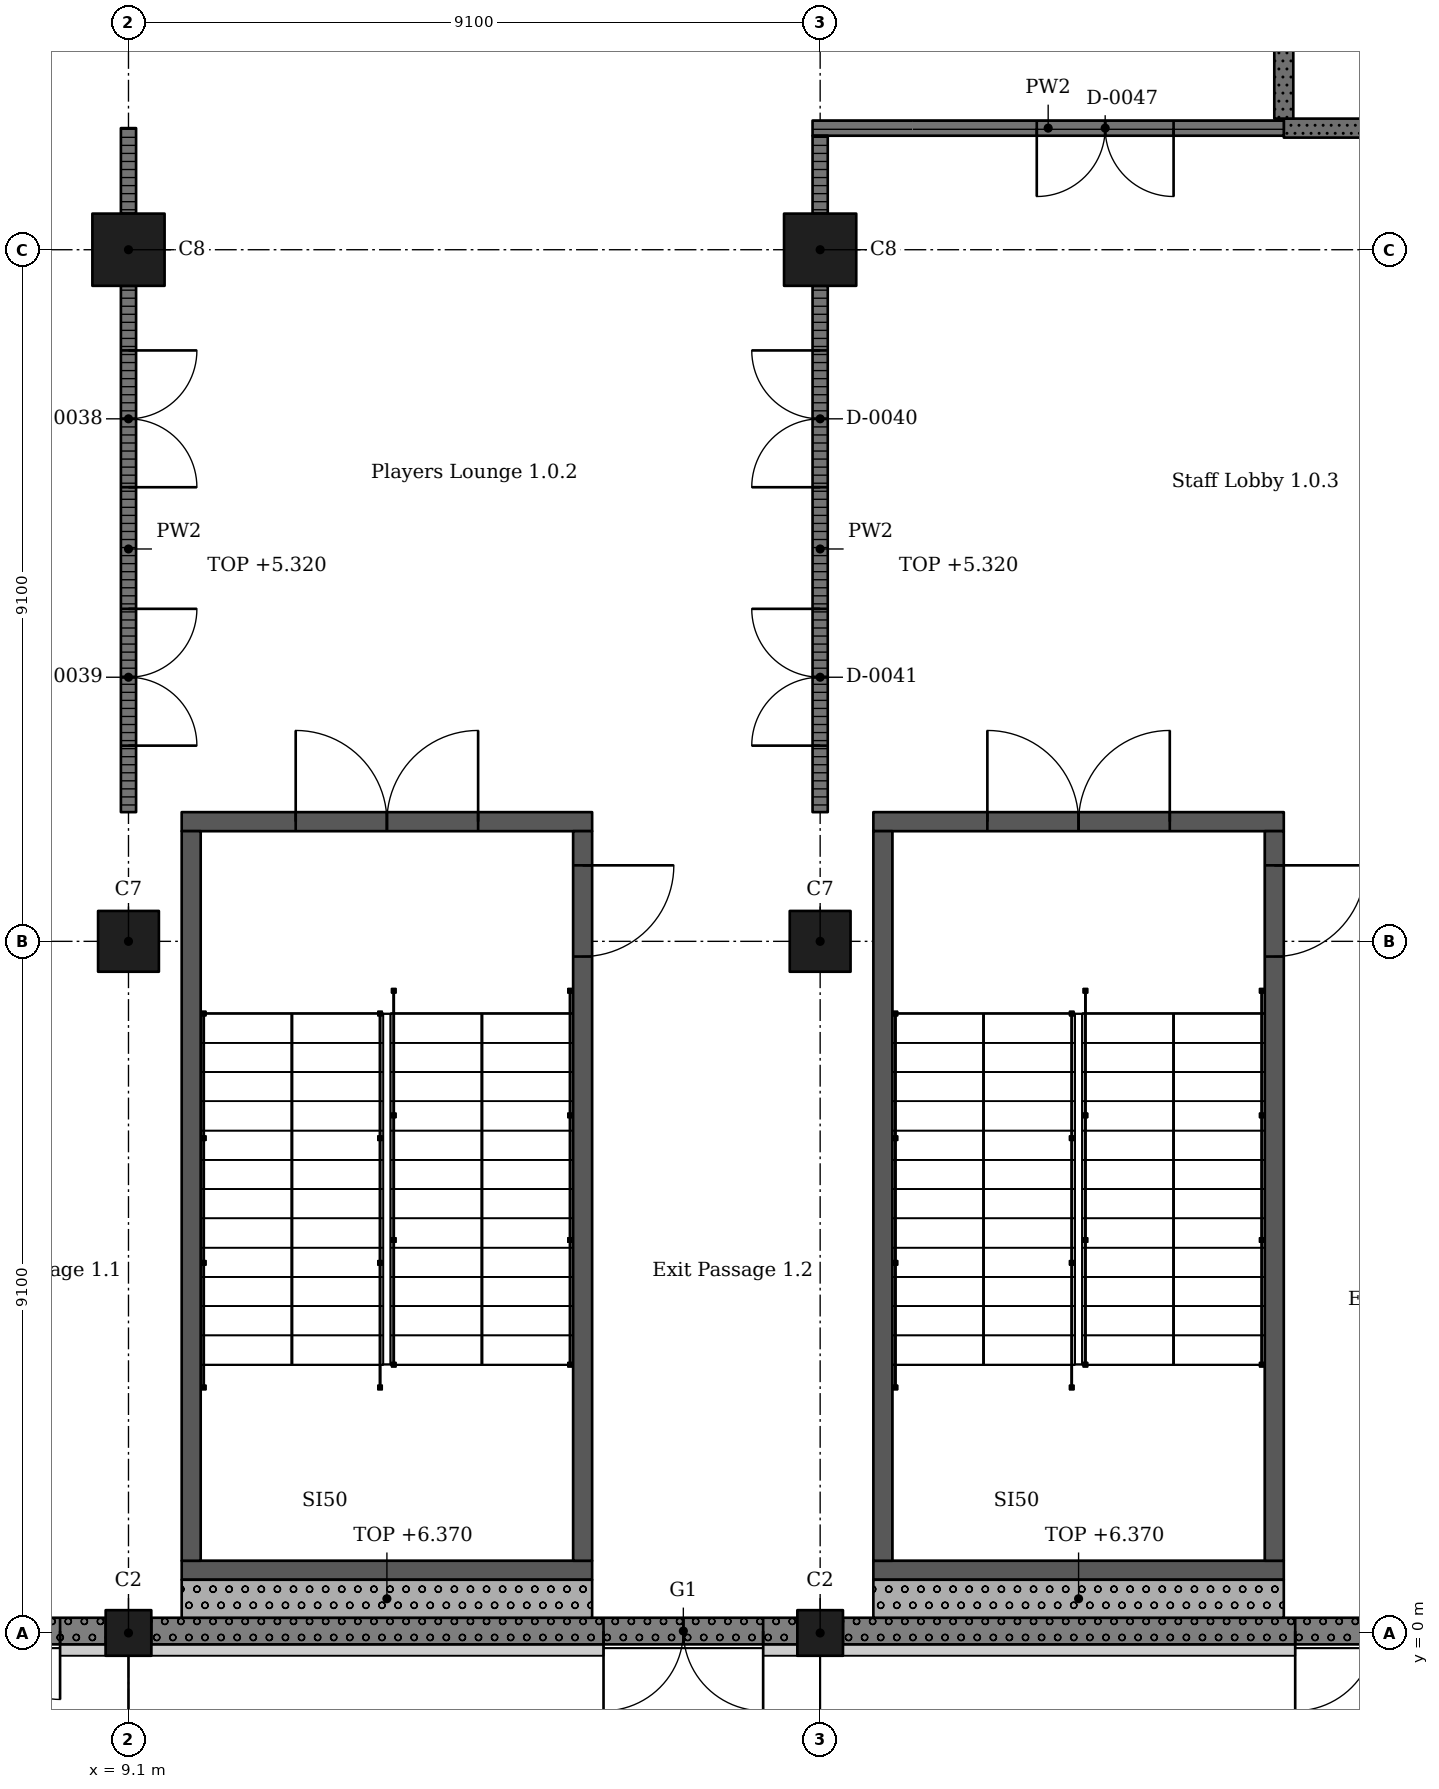
"""IFC4 building model, lengths in metres.
Left out: names, types, materials, properties, quantities, classifications, styles, units other than length and angle.
Written with IfcOpenShell. Run it as: python <this file> out.ifc"""

import sys

from ifc_helpers import new_model, si_unit, direction, frame, frame_2d, origin, origin_2d, place, context, subcontext, project, spatial, rectangle, extrude, element, fill, save


model = new_model("IFC4")
c1 = context("Model", 3, precision=1e-05, world=origin(), true_north=direction((0.0, 1.0)))
c2 = subcontext(c1, "Body", "Model", "MODEL_VIEW")
j1 = project(units=[si_unit("LENGTHUNIT", "METRE"), si_unit("PLANEANGLEUNIT", "RADIAN")], contexts=[c1])
p1 = place(None, origin())
s1 = spatial("IfcSite", under=j1, at=p1, CompositionType="ELEMENT")
p2 = place(p1, origin())
s2 = spatial("IfcBuilding", under=s1, at=p2, CompositionType="ELEMENT")
p3 = place(p2, origin())
s3 = spatial("IfcBuildingStorey", under=s2, at=p3, CompositionType="ELEMENT", Elevation=0.0)
p4 = place(p3, frame((9.1, 0.0, -0.4), z_axis=(0.0, 0.0, 1.0), x_axis=(1.0, 0.0, 0.0)))
e1 = element("IfcColumn", 1, at=p4, inside=s3, PredefinedType="COLUMN", context=c2, shape_type="SweptSolid", body=[
    extrude(rectangle(XDim=0.6, YDim=0.6, at=origin_2d()), origin(), (0.0, 0.0, 1.0), 6.77),
])
p5 = place(p3, frame((9.1, 9.1, -0.4), z_axis=(0.0, 0.0, 1.0), x_axis=(1.0, 0.0, 0.0)))
e2 = element("IfcColumn", 2, at=p5, inside=s3, PredefinedType="COLUMN", context=c2, shape_type="SweptSolid", body=[
    extrude(rectangle(XDim=0.8, YDim=0.8, at=origin_2d()), origin(), (0.0, 0.0, 1.0), 6.77),
])
p6 = place(p3, frame((9.1, 18.2, -0.4), z_axis=(0.0, 0.0, 1.0), x_axis=(1.0, 0.0, 0.0)))
e3 = element("IfcColumn", 3, at=p6, inside=s3, PredefinedType="COLUMN", context=c2, shape_type="SweptSolid", body=[
    extrude(rectangle(XDim=0.95, YDim=0.95, at=origin_2d()), origin(), (0.0, 0.0, 1.0), 6.77),
])
p7 = place(p3, frame((18.2, 0.0, -0.4), z_axis=(0.0, 0.0, 1.0), x_axis=(1.0, 0.0, 0.0)))
e4 = element("IfcColumn", 4, at=p7, inside=s3, PredefinedType="COLUMN", context=c2, shape_type="SweptSolid", body=[
    extrude(rectangle(XDim=0.6, YDim=0.6, at=origin_2d()), origin(), (0.0, 0.0, 1.0), 6.77),
])
p8 = place(p3, frame((18.2, 9.1, -0.4), z_axis=(0.0, 0.0, 1.0), x_axis=(1.0, 0.0, 0.0)))
e5 = element("IfcColumn", 5, at=p8, inside=s3, PredefinedType="COLUMN", context=c2, shape_type="SweptSolid", body=[
    extrude(rectangle(XDim=0.8, YDim=0.8, at=origin_2d()), origin(), (0.0, 0.0, 1.0), 6.77),
])
p9 = place(p3, frame((18.2, 18.2, -0.4), z_axis=(0.0, 0.0, 1.0), x_axis=(1.0, 0.0, 0.0)))
e6 = element("IfcColumn", 6, at=p9, inside=s3, PredefinedType="COLUMN", context=c2, shape_type="SweptSolid", body=[
    extrude(rectangle(XDim=0.95, YDim=0.95, at=origin_2d()), origin(), (0.0, 0.0, 1.0), 6.77),
])
p10 = place(p3, frame((15.2, 0.825, -0.4), z_axis=(0.0, 0.0, 1.0), x_axis=(-1.0, 0.0, 0.0)))
e7 = element("IfcWall", 7, at=p10, inside=s3, PredefinedType="SHEAR", context=c2, shape_type="SweptSolid", body=[
    extrude(rectangle(XDim=5.4, YDim=0.25, at=frame_2d((2.7, 0.0))), origin(), (0.0, 0.0, 1.0), 6.77),
])
p11 = place(p3, frame((15.2, 10.675, -0.4), z_axis=(0.0, 0.0, 1.0), x_axis=(-1.0, 0.0, 0.0)))
e8 = element("IfcWall", 8, at=p11, inside=s3, PredefinedType="SHEAR", context=c2, shape_type="SweptSolid", body=[
    extrude(rectangle(XDim=5.4, YDim=0.25, at=frame_2d((2.7, 0.0))), origin(), (0.0, 0.0, 1.0), 6.77),
])
p12 = place(p11, frame((1.5, 0.0, 0.4)))
e9 = element("IfcOpeningElement", 9, at=p12, cuts=e8, PredefinedType="OPENING", context=c2, shape_type="SweptSolid", body=[
    extrude(rectangle(XDim=2.4, YDim=2.1, at=frame_2d((1.2, 1.05))), frame((0.0, 0.135, 0.0), z_axis=(0.0, -1.0, 0.0), x_axis=(1.0, 0.0, 0.0)), (0.0, 0.0, 1.0), 0.27),
])
p13 = place(p3, frame((9.925, 10.55, -0.4), z_axis=(0.0, 0.0, 1.0), x_axis=(0.0, -1.0, 0.0)))
e10 = element("IfcWall", 10, at=p13, inside=s3, PredefinedType="SHEAR", context=c2, shape_type="SweptSolid", body=[
    extrude(rectangle(XDim=9.6, YDim=0.25, at=frame_2d((4.8, 0.0))), origin(), (0.0, 0.0, 1.0), 6.77),
])
p14 = place(p3, frame((15.075, 10.55, -0.4), z_axis=(0.0, 0.0, 1.0), x_axis=(0.0, -1.0, 0.0)))
e11 = element("IfcWall", 11, at=p14, inside=s3, PredefinedType="SHEAR", context=c2, shape_type="SweptSolid", body=[
    extrude(rectangle(XDim=9.6, YDim=0.25, at=frame_2d((4.8, 0.0))), origin(), (0.0, 0.0, 1.0), 6.77),
])
p15 = place(p14, frame((0.45, 0.0, 0.4)))
e12 = element("IfcOpeningElement", 12, at=p15, cuts=e11, PredefinedType="OPENING", context=c2, shape_type="SweptSolid", body=[
    extrude(rectangle(XDim=1.2, YDim=2.1, at=frame_2d((0.6, 1.05))), frame((0.0, 0.135, 0.0), z_axis=(0.0, -1.0, 0.0), x_axis=(1.0, 0.0, 0.0)), (0.0, 0.0, 1.0), 0.27),
])
p16 = place(p3, frame((24.3, 0.825, -0.4), z_axis=(0.0, 0.0, 1.0), x_axis=(-1.0, 0.0, 0.0)))
e13 = element("IfcWall", 13, at=p16, inside=s3, PredefinedType="SHEAR", context=c2, shape_type="SweptSolid", body=[
    extrude(rectangle(XDim=5.4, YDim=0.25, at=frame_2d((2.7, 0.0))), origin(), (0.0, 0.0, 1.0), 6.77),
])
p17 = place(p3, frame((24.3, 10.675, -0.4), z_axis=(0.0, 0.0, 1.0), x_axis=(-1.0, 0.0, 0.0)))
e14 = element("IfcWall", 14, at=p17, inside=s3, PredefinedType="SHEAR", context=c2, shape_type="SweptSolid", body=[
    extrude(rectangle(XDim=5.4, YDim=0.25, at=frame_2d((2.7, 0.0))), origin(), (0.0, 0.0, 1.0), 6.77),
])
p18 = place(p17, frame((1.5, 0.0, 0.4)))
e15 = element("IfcOpeningElement", 15, at=p18, cuts=e14, PredefinedType="OPENING", context=c2, shape_type="SweptSolid", body=[
    extrude(rectangle(XDim=2.4, YDim=2.1, at=frame_2d((1.2, 1.05))), frame((0.0, 0.135, 0.0), z_axis=(0.0, -1.0, 0.0), x_axis=(1.0, 0.0, 0.0)), (0.0, 0.0, 1.0), 0.27),
])
p19 = place(p3, frame((19.025, 10.55, -0.4), z_axis=(0.0, 0.0, 1.0), x_axis=(0.0, -1.0, 0.0)))
e16 = element("IfcWall", 16, at=p19, inside=s3, PredefinedType="SHEAR", context=c2, shape_type="SweptSolid", body=[
    extrude(rectangle(XDim=9.6, YDim=0.25, at=frame_2d((4.8, 0.0))), origin(), (0.0, 0.0, 1.0), 6.77),
])
p20 = place(p3, frame((24.175, 10.55, -0.4), z_axis=(0.0, 0.0, 1.0), x_axis=(0.0, -1.0, 0.0)))
e17 = element("IfcWall", 17, at=p20, inside=s3, PredefinedType="SHEAR", context=c2, shape_type="SweptSolid", body=[
    extrude(rectangle(XDim=9.6, YDim=0.25, at=frame_2d((4.8, 0.0))), origin(), (0.0, 0.0, 1.0), 6.77),
])
p21 = place(p20, frame((0.45, 0.0, 0.4)))
e18 = element("IfcOpeningElement", 18, at=p21, cuts=e17, PredefinedType="OPENING", context=c2, shape_type="SweptSolid", body=[
    extrude(rectangle(XDim=1.2, YDim=2.1, at=frame_2d((0.6, 1.05))), frame((0.0, 0.135, 0.0), z_axis=(0.0, -1.0, 0.0), x_axis=(1.0, 0.0, 0.0)), (0.0, 0.0, 1.0), 0.27),
])
p22 = place(p3, frame((0.25, 0.025, 0.0), z_axis=(0.0, 0.0, 1.0), x_axis=(1.0, 0.0, 0.0)))
e19 = element("IfcWall", 19, at=p22, inside=s3, PredefinedType="SOLIDWALL", context=c2, shape_type="SweptSolid", body=[
    extrude(rectangle(XDim=8.55, YDim=0.35, at=frame_2d((4.275, 0.0))), origin(), (0.0, 0.0, 1.0), 5.27),
])
p23 = place(p22, frame((6.15, 0.0, 0.0)))
e20 = element("IfcOpeningElement", 20, at=p23, cuts=e19, PredefinedType="OPENING", context=c2, shape_type="SweptSolid", body=[
    extrude(rectangle(XDim=1.8, YDim=2.4, at=frame_2d((0.9, 1.2))), frame((0.0, 0.185, 0.0), z_axis=(0.0, -1.0, 0.0), x_axis=(1.0, 0.0, 0.0)), (0.0, 0.0, 1.0), 0.37),
])
p24 = place(p3, frame((9.4, 0.025, 0.0), z_axis=(0.0, 0.0, 1.0), x_axis=(1.0, 0.0, 0.0)))
e21 = element("IfcWall", 21, at=p24, inside=s3, PredefinedType="SOLIDWALL", context=c2, shape_type="SweptSolid", body=[
    extrude(rectangle(XDim=8.5, YDim=0.35, at=frame_2d((4.25, 0.0))), origin(), (0.0, 0.0, 1.0), 5.27),
])
p25 = place(p24, frame((5.95, 0.0, 0.0)))
e22 = element("IfcOpeningElement", 22, at=p25, cuts=e21, PredefinedType="OPENING", context=c2, shape_type="SweptSolid", body=[
    extrude(rectangle(XDim=2.1, YDim=2.4, at=frame_2d((1.05, 1.2))), frame((0.0, 0.185, 0.0), z_axis=(0.0, -1.0, 0.0), x_axis=(1.0, 0.0, 0.0)), (0.0, 0.0, 1.0), 0.37),
])
p26 = place(p3, frame((18.5, 0.025, 0.0), z_axis=(0.0, 0.0, 1.0), x_axis=(1.0, 0.0, 0.0)))
e23 = element("IfcWall", 23, at=p26, inside=s3, PredefinedType="SOLIDWALL", context=c2, shape_type="SweptSolid", body=[
    extrude(rectangle(XDim=8.45, YDim=0.35, at=frame_2d((4.225, 0.0))), origin(), (0.0, 0.0, 1.0), 5.27),
])
p27 = place(p26, frame((5.95, 0.0, 0.0)))
e24 = element("IfcOpeningElement", 24, at=p27, cuts=e23, PredefinedType="OPENING", context=c2, shape_type="SweptSolid", body=[
    extrude(rectangle(XDim=2.1, YDim=2.4, at=frame_2d((1.05, 1.2))), frame((0.0, 0.185, 0.0), z_axis=(0.0, -1.0, 0.0), x_axis=(1.0, 0.0, 0.0)), (0.0, 0.0, 1.0), 0.37),
])
p28 = place(p3, frame((9.8, 0.45, 0.0), z_axis=(0.0, 0.0, 1.0), x_axis=(1.0, 0.0, 0.0)))
e25 = element("IfcWall", 25, at=p28, inside=s3, PredefinedType="SOLIDWALL", context=c2, shape_type="SweptSolid", body=[
    extrude(rectangle(XDim=5.4, YDim=0.5, at=frame_2d((2.7, 0.0))), origin(), (0.0, 0.0, 1.0), 6.37),
])
p29 = place(p3, frame((18.9, 0.45, 0.0), z_axis=(0.0, 0.0, 1.0), x_axis=(1.0, 0.0, 0.0)))
e26 = element("IfcWall", 26, at=p29, inside=s3, PredefinedType="SOLIDWALL", context=c2, shape_type="SweptSolid", body=[
    extrude(rectangle(XDim=5.4, YDim=0.5, at=frame_2d((2.7, 0.0))), origin(), (0.0, 0.0, 1.0), 6.37),
])
p30 = place(p3, frame((9.1, 17.725, 0.0), z_axis=(0.0, 0.0, 1.0), x_axis=(0.0, -1.0, 0.0)))
e27 = element("IfcWall", 27, at=p30, inside=s3, PredefinedType="PARTITIONING", context=c2, shape_type="SweptSolid", body=[
    extrude(rectangle(XDim=6.925, YDim=0.2, at=frame_2d((3.462, 0.0))), origin(), (0.0, 0.0, 1.0), 5.32),
])
p31 = place(p30, frame((0.85, 0.0, 0.0)))
e28 = element("IfcOpeningElement", 28, at=p31, cuts=e27, PredefinedType="OPENING", context=c2, shape_type="SweptSolid", body=[
    extrude(rectangle(XDim=1.8, YDim=2.4, at=frame_2d((0.9, 1.2))), frame((0.0, 0.11, 0.0), z_axis=(0.0, -1.0, 0.0), x_axis=(1.0, 0.0, 0.0)), (0.0, 0.0, 1.0), 0.22),
])
p32 = place(p30, frame((4.25, 0.0, 0.0)))
e29 = element("IfcOpeningElement", 29, at=p32, cuts=e27, PredefinedType="OPENING", context=c2, shape_type="SweptSolid", body=[
    extrude(rectangle(XDim=1.8, YDim=2.4, at=frame_2d((0.9, 1.2))), frame((0.0, 0.11, 0.0), z_axis=(0.0, -1.0, 0.0), x_axis=(1.0, 0.0, 0.0)), (0.0, 0.0, 1.0), 0.22),
])
p33 = place(p3, frame((9.1, 19.8, 0.0), z_axis=(0.0, 0.0, 1.0), x_axis=(0.0, -1.0, 0.0)))
e30 = element("IfcWall", 30, at=p33, inside=s3, PredefinedType="PARTITIONING", context=c2, shape_type="SweptSolid", body=[
    extrude(rectangle(XDim=1.125, YDim=0.2, at=frame_2d((0.562, 0.0))), origin(), (0.0, 0.0, 1.0), 5.32),
])
p34 = place(p3, frame((18.1, 19.8, 0.0), z_axis=(0.0, 0.0, 1.0), x_axis=(1.0, 0.0, 0.0)))
e31 = element("IfcWall", 31, at=p34, inside=s3, PredefinedType="PARTITIONING", context=c2, shape_type="SweptSolid", body=[
    extrude(rectangle(XDim=6.2, YDim=0.2, at=frame_2d((3.1, 0.0))), origin(), (0.0, 0.0, 1.0), 6.02),
])
p35 = place(p34, frame((2.95, 0.0, 0.0)))
e32 = element("IfcOpeningElement", 32, at=p35, cuts=e31, PredefinedType="OPENING", context=c2, shape_type="SweptSolid", body=[
    extrude(rectangle(XDim=1.8, YDim=2.4, at=frame_2d((0.9, 1.2))), frame((0.0, 0.11, 0.0), z_axis=(0.0, -1.0, 0.0), x_axis=(1.0, 0.0, 0.0)), (0.0, 0.0, 1.0), 0.22),
])
p36 = place(p3, frame((18.2, 17.725, 0.0), z_axis=(0.0, 0.0, 1.0), x_axis=(0.0, -1.0, 0.0)))
e33 = element("IfcWall", 33, at=p36, inside=s3, PredefinedType="PARTITIONING", context=c2, shape_type="SweptSolid", body=[
    extrude(rectangle(XDim=6.925, YDim=0.2, at=frame_2d((3.462, 0.0))), origin(), (0.0, 0.0, 1.0), 5.32),
])
p37 = place(p36, frame((0.85, 0.0, 0.0)))
e34 = element("IfcOpeningElement", 34, at=p37, cuts=e33, PredefinedType="OPENING", context=c2, shape_type="SweptSolid", body=[
    extrude(rectangle(XDim=1.8, YDim=2.4, at=frame_2d((0.9, 1.2))), frame((0.0, 0.11, 0.0), z_axis=(0.0, -1.0, 0.0), x_axis=(1.0, 0.0, 0.0)), (0.0, 0.0, 1.0), 0.22),
])
p38 = place(p36, frame((4.25, 0.0, 0.0)))
e35 = element("IfcOpeningElement", 35, at=p38, cuts=e33, PredefinedType="OPENING", context=c2, shape_type="SweptSolid", body=[
    extrude(rectangle(XDim=1.8, YDim=2.4, at=frame_2d((0.9, 1.2))), frame((0.0, 0.11, 0.0), z_axis=(0.0, -1.0, 0.0), x_axis=(1.0, 0.0, 0.0)), (0.0, 0.0, 1.0), 0.22),
])
p39 = place(p3, frame((18.2, 19.7, 0.0), z_axis=(0.0, 0.0, 1.0), x_axis=(0.0, -1.0, 0.0)))
e36 = element("IfcWall", 36, at=p39, inside=s3, PredefinedType="PARTITIONING", context=c2, shape_type="SweptSolid", body=[
    extrude(rectangle(XDim=1.025, YDim=0.2, at=frame_2d((0.512, 0.0))), origin(), (0.0, 0.0, 1.0), 5.32),
])
p40 = place(p3, frame((24.3, 19.8, 0.0), z_axis=(0.0, 0.0, 1.0), x_axis=(1.0, 0.0, 0.0)))
e37 = element("IfcWall", 37, at=p40, inside=s3, PredefinedType="SOLIDWALL", context=c2, shape_type="SweptSolid", body=[
    extrude(rectangle(XDim=2.65, YDim=0.25, at=frame_2d((1.325, 0.0))), origin(), (0.0, 0.0, 1.0), 6.02),
])
p41 = place(p3, frame((24.3, 22.8, 0.0), z_axis=(0.0, 0.0, 1.0), x_axis=(0.0, -1.0, 0.0)))
e38 = element("IfcWall", 38, at=p41, inside=s3, PredefinedType="SOLIDWALL", context=c2, shape_type="SweptSolid", body=[
    extrude(rectangle(XDim=2.875, YDim=0.25, at=frame_2d((1.438, 0.0))), origin(), (0.0, 0.0, 1.0), 6.02),
])
p42 = place(p23, frame((1.8, 0.0, 0.0), z_axis=(0.0, 0.0, 1.0), x_axis=(-1.0, 0.0, 0.0)))
e39 = element("IfcDoor", 39, at=p42, inside=s3, OperationType="DOUBLE_DOOR_SINGLE_SWING", PredefinedType="DOOR", context=c2, shape_type="SweptSolid", body=[
    extrude(rectangle(XDim=1.8, YDim=2.4, at=frame_2d((0.9, 1.2))), frame((0.0, 0.025, 0.0), z_axis=(0.0, -1.0, 0.0), x_axis=(1.0, 0.0, 0.0)), (0.0, 0.0, 1.0), 0.05),
])
fill(e20, e39)
p43 = place(p25, frame((2.1, 0.0, 0.0), z_axis=(0.0, 0.0, 1.0), x_axis=(-1.0, 0.0, 0.0)))
e40 = element("IfcDoor", 40, at=p43, inside=s3, OperationType="DOUBLE_DOOR_SINGLE_SWING", PredefinedType="DOOR", context=c2, shape_type="SweptSolid", body=[
    extrude(rectangle(XDim=2.1, YDim=2.4, at=frame_2d((1.05, 1.2))), frame((0.0, 0.025, 0.0), z_axis=(0.0, -1.0, 0.0), x_axis=(1.0, 0.0, 0.0)), (0.0, 0.0, 1.0), 0.05),
])
fill(e22, e40)
p44 = place(p27, frame((2.1, 0.0, 0.0), z_axis=(0.0, 0.0, 1.0), x_axis=(-1.0, 0.0, 0.0)))
e41 = element("IfcDoor", 41, at=p44, inside=s3, OperationType="DOUBLE_DOOR_SINGLE_SWING", PredefinedType="DOOR", context=c2, shape_type="SweptSolid", body=[
    extrude(rectangle(XDim=2.1, YDim=2.4, at=frame_2d((1.05, 1.2))), frame((0.0, 0.025, 0.0), z_axis=(0.0, -1.0, 0.0), x_axis=(1.0, 0.0, 0.0)), (0.0, 0.0, 1.0), 0.05),
])
fill(e24, e41)
p45 = place(p31, origin())
e42 = element("IfcDoor", 42, at=p45, inside=s3, OperationType="DOUBLE_DOOR_SINGLE_SWING", PredefinedType="DOOR", context=c2, shape_type="SweptSolid", body=[
    extrude(rectangle(XDim=1.8, YDim=2.4, at=frame_2d((0.9, 1.2))), frame((0.0, 0.025, 0.0), z_axis=(0.0, -1.0, 0.0), x_axis=(1.0, 0.0, 0.0)), (0.0, 0.0, 1.0), 0.05),
])
fill(e28, e42)
p46 = place(p32, origin())
e43 = element("IfcDoor", 43, at=p46, inside=s3, OperationType="DOUBLE_DOOR_SINGLE_SWING", PredefinedType="DOOR", context=c2, shape_type="SweptSolid", body=[
    extrude(rectangle(XDim=1.8, YDim=2.4, at=frame_2d((0.9, 1.2))), frame((0.0, 0.025, 0.0), z_axis=(0.0, -1.0, 0.0), x_axis=(1.0, 0.0, 0.0)), (0.0, 0.0, 1.0), 0.05),
])
fill(e29, e43)
p47 = place(p37, origin())
e44 = element("IfcDoor", 44, at=p47, inside=s3, OperationType="DOUBLE_DOOR_SINGLE_SWING", PredefinedType="DOOR", context=c2, shape_type="SweptSolid", body=[
    extrude(rectangle(XDim=1.8, YDim=2.4, at=frame_2d((0.9, 1.2))), frame((0.0, 0.025, 0.0), z_axis=(0.0, -1.0, 0.0), x_axis=(1.0, 0.0, 0.0)), (0.0, 0.0, 1.0), 0.05),
])
fill(e34, e44)
p48 = place(p38, origin())
e45 = element("IfcDoor", 45, at=p48, inside=s3, OperationType="DOUBLE_DOOR_SINGLE_SWING", PredefinedType="DOOR", context=c2, shape_type="SweptSolid", body=[
    extrude(rectangle(XDim=1.8, YDim=2.4, at=frame_2d((0.9, 1.2))), frame((0.0, 0.025, 0.0), z_axis=(0.0, -1.0, 0.0), x_axis=(1.0, 0.0, 0.0)), (0.0, 0.0, 1.0), 0.05),
])
fill(e35, e45)
p49 = place(p35, origin())
e46 = element("IfcDoor", 46, at=p49, inside=s3, OperationType="DOUBLE_DOOR_SINGLE_SWING", PredefinedType="DOOR", context=c2, shape_type="SweptSolid", body=[
    extrude(rectangle(XDim=1.8, YDim=2.4, at=frame_2d((0.9, 1.2))), frame((0.0, 0.025, 0.0), z_axis=(0.0, -1.0, 0.0), x_axis=(1.0, 0.0, 0.0)), (0.0, 0.0, 1.0), 0.05),
])
fill(e32, e46)
p50 = place(p12, origin())
e47 = element("IfcDoor", 47, at=p50, inside=s3, OperationType="DOUBLE_DOOR_SINGLE_SWING", PredefinedType="DOOR", context=c2, shape_type="SweptSolid", body=[
    extrude(rectangle(XDim=2.4, YDim=2.1, at=frame_2d((1.2, 1.05))), frame((0.0, 0.025, 0.0), z_axis=(0.0, -1.0, 0.0), x_axis=(1.0, 0.0, 0.0)), (0.0, 0.0, 1.0), 0.05),
])
fill(e9, e47)
p51 = place(p18, origin())
e48 = element("IfcDoor", 48, at=p51, inside=s3, OperationType="DOUBLE_DOOR_SINGLE_SWING", PredefinedType="DOOR", context=c2, shape_type="SweptSolid", body=[
    extrude(rectangle(XDim=2.4, YDim=2.1, at=frame_2d((1.2, 1.05))), frame((0.0, 0.025, 0.0), z_axis=(0.0, -1.0, 0.0), x_axis=(1.0, 0.0, 0.0)), (0.0, 0.0, 1.0), 0.05),
])
fill(e15, e48)
p52 = place(p15, origin())
e49 = element("IfcDoor", 49, at=p52, inside=s3, OperationType="SINGLE_SWING_RIGHT", PredefinedType="DOOR", context=c2, shape_type="SweptSolid", body=[
    extrude(rectangle(XDim=1.2, YDim=2.1, at=frame_2d((0.6, 1.05))), frame((0.0, 0.025, 0.0), z_axis=(0.0, -1.0, 0.0), x_axis=(1.0, 0.0, 0.0)), (0.0, 0.0, 1.0), 0.05),
])
fill(e12, e49)
p53 = place(p21, origin())
e50 = element("IfcDoor", 50, at=p53, inside=s3, OperationType="SINGLE_SWING_RIGHT", PredefinedType="DOOR", context=c2, shape_type="SweptSolid", body=[
    extrude(rectangle(XDim=1.2, YDim=2.1, at=frame_2d((0.6, 1.05))), frame((0.0, 0.025, 0.0), z_axis=(0.0, -1.0, 0.0), x_axis=(1.0, 0.0, 0.0)), (0.0, 0.0, 1.0), 0.05),
])
fill(e18, e50)
save(model, sys.argv[1])
